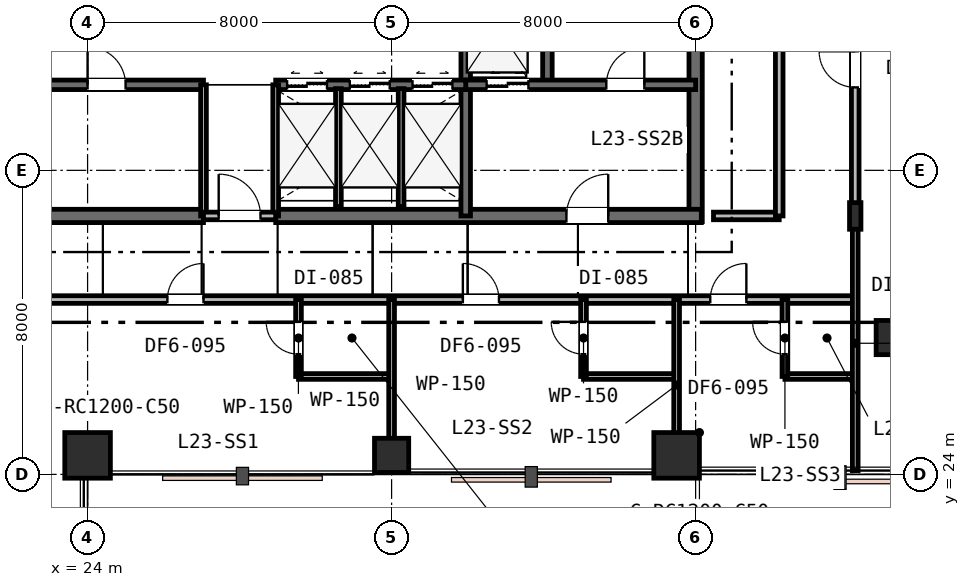
"""IFC4 building model, lengths in metres.
Left out: names, types, materials, properties, quantities, classifications, styles, units other than length and angle.
Written with IfcOpenShell. Run it as: python <this file> out.ifc"""

import sys

from ifc_helpers import new_model, si_unit, direction, frame, frame_2d, origin, origin_2d, place, context, subcontext, project, spatial, rectangle, i_section, extrude, element, fill, save


model = new_model("IFC4")
c1 = context("Model", 3, precision=1e-05, world=origin(), true_north=direction((0.0, 1.0)))
c2 = subcontext(c1, "Body", "Model", "MODEL_VIEW")
j1 = project(units=[si_unit("LENGTHUNIT", "METRE"), si_unit("PLANEANGLEUNIT", "RADIAN")], contexts=[c1])
p1 = place(None, origin())
s1 = spatial("IfcSite", under=j1, at=p1, CompositionType="ELEMENT")
p2 = place(p1, origin())
s2 = spatial("IfcBuilding", under=s1, at=p2, CompositionType="ELEMENT")
p3 = place(p2, frame((0.0, 0.0, 93.6)))
s3 = spatial("IfcBuildingStorey", under=s2, at=p3, CompositionType="ELEMENT", Elevation=93.6)
p4 = place(p3, frame((40.0, 30.65, 0.0), z_axis=(0.0, 0.0, 1.0), x_axis=(0.0, 1.0, 0.0)))
e1 = element("IfcWall", 1, at=p4, inside=s3, PredefinedType="SHEAR", context=c2, shape_type="SweptSolid", body=[
    extrude(rectangle(XDim=12.3, YDim=0.35, at=frame_2d((6.15, 0.0))), origin(), (0.0, 0.0, 1.0), 3.6),
])
p5 = place(p3, frame((15.85, 30.8, 0.0), z_axis=(0.0, 0.0, 1.0), x_axis=(1.0, 0.0, 0.0)))
e2 = element("IfcWall", 2, at=p5, inside=s3, PredefinedType="SHEAR", context=c2, shape_type="SweptSolid", body=[
    extrude(rectangle(XDim=11.2, YDim=0.35, at=frame_2d((5.6, 0.0))), origin(), (0.0, 0.0, 1.0), 3.6),
])
p6 = place(p5, frame((2.45, 0.0, 0.0)))
e3 = element("IfcOpeningElement", 3, at=p6, cuts=e2, PredefinedType="OPENING", context=c2, shape_type="SweptSolid", body=[
    extrude(rectangle(XDim=1.1, YDim=2.15, at=frame_2d((0.55, 1.075))), frame((0.0, 0.185, 0.0), z_axis=(0.0, -1.0, 0.0), x_axis=(1.0, 0.0, 0.0)), (0.0, 0.0, 1.0), 0.37),
])
p7 = place(p3, frame((28.95, 30.8, 0.0), z_axis=(0.0, 0.0, 1.0), x_axis=(1.0, 0.0, 0.0)))
e4 = element("IfcWall", 4, at=p7, inside=s3, PredefinedType="SHEAR", context=c2, shape_type="SweptSolid", body=[
    extrude(rectangle(XDim=11.2, YDim=0.35, at=frame_2d((5.6, 0.0))), origin(), (0.0, 0.0, 1.0), 3.6),
])
p8 = place(p7, frame((7.65, 0.0, 0.0)))
e5 = element("IfcOpeningElement", 5, at=p8, cuts=e4, PredefinedType="OPENING", context=c2, shape_type="SweptSolid", body=[
    extrude(rectangle(XDim=1.1, YDim=2.15, at=frame_2d((0.55, 1.075))), frame((0.0, 0.185, 0.0), z_axis=(0.0, -1.0, 0.0), x_axis=(1.0, 0.0, 0.0)), (0.0, 0.0, 1.0), 0.37),
])
p9 = place(p3, frame((36.1, 34.25, 0.0), z_axis=(0.0, 0.0, 1.0), x_axis=(0.0, 1.0, 0.0)))
e6 = element("IfcWall", 6, at=p9, inside=s3, PredefinedType="SHEAR", context=c2, shape_type="SweptSolid", body=[
    extrude(rectangle(XDim=8.65, YDim=0.25, at=frame_2d((4.325, 0.0))), origin(), (0.0, 0.0, 1.0), 3.6),
])
p10 = place(p3, frame((33.95, 30.8, 0.0), z_axis=(0.0, 0.0, 1.0), x_axis=(0.0, 1.0, 0.0)))
e7 = element("IfcWall", 7, at=p10, inside=s3, PredefinedType="SHEAR", context=c2, shape_type="SweptSolid", body=[
    extrude(rectangle(XDim=6.45, YDim=0.25, at=frame_2d((3.225, 0.0))), origin(), (0.0, 0.0, 1.0), 3.6),
])
p11 = place(p3, frame((33.95, 34.25, 0.0), z_axis=(0.0, 0.0, 1.0), x_axis=(1.0, 0.0, 0.0)))
e8 = element("IfcWall", 8, at=p11, inside=s3, PredefinedType="SHEAR", context=c2, shape_type="SweptSolid", body=[
    extrude(rectangle(XDim=6.05, YDim=0.25, at=frame_2d((3.025, 0.0))), origin(), (0.0, 0.0, 1.0), 3.6),
])
p12 = place(p11, frame((3.7, 0.0, 0.0)))
e9 = element("IfcOpeningElement", 9, at=p12, cuts=e8, PredefinedType="OPENING", context=c2, shape_type="SweptSolid", body=[
    extrude(rectangle(XDim=1.0, YDim=2.15, at=frame_2d((0.5, 1.075))), frame((0.0, 0.135, 0.0), z_axis=(0.0, -1.0, 0.0), x_axis=(1.0, 0.0, 0.0)), (0.0, 0.0, 1.0), 0.27),
])
p13 = place(p11, frame((0.55, 0.0, 0.0)))
e10 = element("IfcOpeningElement", 10, at=p13, cuts=e8, PredefinedType="OPENING", context=c2, shape_type="SweptSolid", body=[
    extrude(rectangle(XDim=1.1, YDim=2.15, at=frame_2d((0.55, 1.075))), frame((0.0, 0.135, 0.0), z_axis=(0.0, -1.0, 0.0), x_axis=(1.0, 0.0, 0.0)), (0.0, 0.0, 1.0), 0.27),
])
p14 = place(p3, frame((22.05, 34.25, 0.0), z_axis=(0.0, 0.0, 1.0), x_axis=(1.0, 0.0, 0.0)))
e11 = element("IfcWall", 11, at=p14, inside=s3, PredefinedType="SHEAR", context=c2, shape_type="SweptSolid", body=[
    extrude(rectangle(XDim=5.0, YDim=0.25, at=frame_2d((2.5, 0.0))), origin(), (0.0, 0.0, 1.0), 3.6),
])
p15 = place(p14, frame((1.95, 0.0, 0.0)))
e12 = element("IfcOpeningElement", 12, at=p15, cuts=e11, PredefinedType="OPENING", context=c2, shape_type="SweptSolid", body=[
    extrude(rectangle(XDim=1.0, YDim=2.15, at=frame_2d((0.5, 1.075))), frame((0.0, 0.135, 0.0), z_axis=(0.0, -1.0, 0.0), x_axis=(1.0, 0.0, 0.0)), (0.0, 0.0, 1.0), 0.27),
])
p16 = place(p3, frame((28.95, 34.25, 0.0), z_axis=(0.0, 0.0, 1.0), x_axis=(1.0, 0.0, 0.0)))
e13 = element("IfcWall", 13, at=p16, inside=s3, PredefinedType="SHEAR", context=c2, shape_type="SweptSolid", body=[
    extrude(rectangle(XDim=5.0, YDim=0.25, at=frame_2d((2.5, 0.0))), origin(), (0.0, 0.0, 1.0), 3.6),
])
p17 = place(p16, frame((0.3, 0.0, 0.0)))
e14 = element("IfcOpeningElement", 14, at=p17, cuts=e13, PredefinedType="OPENING", context=c2, shape_type="SweptSolid", body=[
    extrude(rectangle(XDim=1.05, YDim=2.15, at=frame_2d((0.525, 1.075))), frame((0.0, 0.135, 0.0), z_axis=(0.0, -1.0, 0.0), x_axis=(1.0, 0.0, 0.0)), (0.0, 0.0, 1.0), 0.27),
])
p18 = place(p16, frame((1.95, 0.0, 0.0)))
e15 = element("IfcOpeningElement", 15, at=p18, cuts=e13, PredefinedType="OPENING", context=c2, shape_type="SweptSolid", body=[
    extrude(rectangle(XDim=1.05, YDim=2.15, at=frame_2d((0.525, 1.075))), frame((0.0, 0.135, 0.0), z_axis=(0.0, -1.0, 0.0), x_axis=(1.0, 0.0, 0.0)), (0.0, 0.0, 1.0), 0.27),
])
p19 = place(p16, frame((3.6, 0.0, 0.0)))
e16 = element("IfcOpeningElement", 16, at=p19, cuts=e13, PredefinedType="OPENING", context=c2, shape_type="SweptSolid", body=[
    extrude(rectangle(XDim=1.05, YDim=2.15, at=frame_2d((0.525, 1.075))), frame((0.0, 0.135, 0.0), z_axis=(0.0, -1.0, 0.0), x_axis=(1.0, 0.0, 0.0)), (0.0, 0.0, 1.0), 0.27),
])
p20 = place(p3, frame((24.0, 24.5, 0.0), z_axis=(0.0, 0.0, 1.0), x_axis=(1.0, 0.0, 0.0)))
e17 = element("IfcColumn", 17, at=p20, inside=s3, PredefinedType="COLUMN", context=c2, shape_type="SweptSolid", body=[
    extrude(rectangle(XDim=1.2, YDim=1.2, at=origin_2d()), origin(), (0.0, 0.0, 1.0), 3.6),
])
p21 = place(p3, frame((32.0, 24.5, 0.0), z_axis=(0.0, 0.0, 1.0), x_axis=(1.0, 0.0, 0.0)))
e18 = element("IfcColumn", 18, at=p21, inside=s3, PredefinedType="COLUMN", context=c2, shape_type="SweptSolid", body=[
    extrude(rectangle(XDim=0.9, YDim=0.9, at=origin_2d()), origin(), (0.0, 0.0, 1.0), 3.6),
])
p22 = place(p3, frame((39.5, 24.5, 0.0), z_axis=(0.0, 0.0, 1.0), x_axis=(1.0, 0.0, 0.0)))
e19 = element("IfcColumn", 19, at=p22, inside=s3, PredefinedType="COLUMN", context=c2, shape_type="SweptSolid", body=[
    extrude(rectangle(XDim=1.2, YDim=1.2, at=origin_2d()), origin(), (0.0, 0.0, 1.0), 3.6),
])
p23 = place(p3, frame((45.2, 27.6, 0.0), z_axis=(0.0, 0.0, 1.0), x_axis=(1.0, 0.0, 0.0)))
e20 = element("IfcColumn", 20, at=p23, inside=s3, PredefinedType="COLUMN", context=c2, shape_type="SweptSolid", body=[
    extrude(rectangle(XDim=0.9, YDim=0.9, at=origin_2d()), origin(), (0.0, 0.0, 1.0), 3.6),
])
p24 = place(p3, frame((44.2, 30.8, 0.0), z_axis=(0.0, 0.0, 1.0), x_axis=(1.0, 0.0, 0.0)))
e21 = element("IfcColumn", 21, at=p24, inside=s3, PredefinedType="COLUMN", context=c2, shape_type="SweptSolid", body=[
    extrude(i_section(OverallWidth=0.3, OverallDepth=0.7, WebThickness=0.017, FlangeThickness=0.032, FilletRadius=0.027, at=origin_2d()), origin(), (0.0, 0.0, 1.0), 3.6),
])
p25 = place(p3, frame((27.05, 30.8, 0.0), z_axis=(0.0, 0.0, 1.0), x_axis=(0.0, 1.0, 0.0)))
e22 = element("IfcWall", 22, at=p25, inside=s3, PredefinedType="PLUMBINGWALL", context=c2, shape_type="SweptSolid", body=[
    extrude(rectangle(XDim=3.45, YDim=0.15, at=frame_2d((1.725, 0.0))), origin(), (0.0, 0.0, 1.0), 3.02),
])
p26 = place(p3, frame((28.95, 30.8, 0.0), z_axis=(0.0, 0.0, 1.0), x_axis=(0.0, 1.0, 0.0)))
e23 = element("IfcWall", 23, at=p26, inside=s3, PredefinedType="PLUMBINGWALL", context=c2, shape_type="SweptSolid", body=[
    extrude(rectangle(XDim=3.45, YDim=0.15, at=frame_2d((1.725, 0.0))), origin(), (0.0, 0.0, 1.0), 3.33),
])
p27 = place(p3, frame((27.05, 30.8, 0.0), z_axis=(0.0, 0.0, 1.0), x_axis=(1.0, 0.0, 0.0)))
e24 = element("IfcWall", 24, at=p27, inside=s3, PredefinedType="PARTITIONING", context=c2, shape_type="SweptSolid", body=[
    extrude(rectangle(XDim=1.9, YDim=0.2, at=frame_2d((0.95, 0.0))), origin(), (0.0, 0.0, 1.0), 3.02),
])
p28 = place(p27, frame((0.4, 0.0, 0.0)))
e25 = element("IfcOpeningElement", 25, at=p28, cuts=e24, PredefinedType="OPENING", context=c2, shape_type="SweptSolid", body=[
    extrude(rectangle(XDim=1.1, YDim=2.15, at=frame_2d((0.55, 1.075))), frame((0.0, 0.11, 0.0), z_axis=(0.0, -1.0, 0.0), x_axis=(1.0, 0.0, 0.0)), (0.0, 0.0, 1.0), 0.22),
])
for number, where, z_axis, x_axis in (
    (26, (30.6, 31.05, 0.0), (0.0, 0.0, 1.0), (0.0, 1.0, 0.0)),
    (27, (32.25, 31.05, 0.0), (0.0, 0.0, 1.0), (0.0, 1.0, 0.0)),
):
    element("IfcWall", number, at=place(p3, frame(where, z_axis=z_axis, x_axis=x_axis)), inside=s3, PredefinedType="PLUMBINGWALL", context=c2, shape_type="SweptSolid", body=[
        extrude(rectangle(XDim=3.1, YDim=0.15, at=frame_2d((1.55, 0.0))), origin(), (0.0, 0.0, 1.0), 3.33),
    ])
p29 = place(p3, frame((11.4, 28.6, 0.0), z_axis=(0.0, 0.0, 1.0), x_axis=(1.0, 0.0, 0.0)))
e28 = element("IfcWall", 28, at=p29, inside=s3, PredefinedType="PARTITIONING", context=c2, shape_type="SweptSolid", body=[
    extrude(rectangle(XDim=32.8, YDim=0.2, at=frame_2d((16.4, 0.0))), origin(), (0.0, 0.0, 1.0), 2.83),
])
p30 = place(p29, frame((14.7, 0.0, 0.0)))
e29 = element("IfcOpeningElement", 29, at=p30, cuts=e28, PredefinedType="OPENING", context=c2, shape_type="SweptSolid", body=[
    extrude(rectangle(XDim=0.95, YDim=2.15, at=frame_2d((0.475, 1.075))), frame((0.0, 0.11, 0.0), z_axis=(0.0, -1.0, 0.0), x_axis=(1.0, 0.0, 0.0)), (0.0, 0.0, 1.0), 0.22),
])
p31 = place(p29, frame((22.475, 0.0, 0.0)))
e30 = element("IfcOpeningElement", 30, at=p31, cuts=e28, PredefinedType="OPENING", context=c2, shape_type="SweptSolid", body=[
    extrude(rectangle(XDim=0.95, YDim=2.15, at=frame_2d((0.475, 1.075))), frame((0.0, 0.11, 0.0), z_axis=(0.0, -1.0, 0.0), x_axis=(1.0, 0.0, 0.0)), (0.0, 0.0, 1.0), 0.22),
])
p32 = place(p29, frame((28.985, 0.0, 0.0)))
e31 = element("IfcOpeningElement", 31, at=p32, cuts=e28, PredefinedType="OPENING", context=c2, shape_type="SweptSolid", body=[
    extrude(rectangle(XDim=0.95, YDim=2.15, at=frame_2d((0.475, 1.075))), frame((0.0, 0.11, 0.0), z_axis=(0.0, -1.0, 0.0), x_axis=(1.0, 0.0, 0.0)), (0.0, 0.0, 1.0), 0.22),
])
p33 = place(p3, frame((40.47, 30.8, 0.0), z_axis=(0.0, 0.0, 1.0), x_axis=(1.0, 0.0, 0.0)))
e32 = element("IfcWall", 32, at=p33, inside=s3, PredefinedType="PARTITIONING", context=c2, shape_type="SweptSolid", body=[
    extrude(rectangle(XDim=1.73, YDim=0.2, at=frame_2d((0.865, 0.0))), origin(), (0.0, 0.0, 1.0), 2.83),
])
p34 = place(p3, frame((42.2, 30.8, 0.0), z_axis=(0.0, 0.0, 1.0), x_axis=(0.0, 1.0, 0.0)))
e33 = element("IfcWall", 33, at=p34, inside=s3, PredefinedType="PARTITIONING", context=c2, shape_type="SweptSolid", body=[
    extrude(rectangle(XDim=11.2, YDim=0.2, at=frame_2d((5.6, 0.0))), origin(), (0.0, 0.0, 1.0), 2.83),
])
p35 = place(p3, frame((29.55, 26.576, 0.0), z_axis=(0.0, 0.0, 1.0), x_axis=(1.0, 0.0, 0.0)))
e34 = element("IfcWall", 34, at=p35, inside=s3, PredefinedType="PARTITIONING", context=c2, shape_type="SweptSolid", body=[
    extrude(rectangle(XDim=2.45, YDim=0.15, at=frame_2d((1.225, 0.0))), origin(), (0.0, 0.0, 1.0), 3.33),
])
p36 = place(p3, frame((29.55, 26.576, 0.0), z_axis=(0.0, 0.0, 1.0), x_axis=(0.0, 1.0, 0.0)))
e35 = element("IfcWall", 35, at=p36, inside=s3, PredefinedType="PARTITIONING", context=c2, shape_type="SweptSolid", body=[
    extrude(rectangle(XDim=2.024, YDim=0.15, at=frame_2d((1.012, 0.0))), origin(), (0.0, 0.0, 1.0), 3.33),
])
p37 = place(p36, frame((0.587, 0.0, 0.0)))
e36 = element("IfcOpeningElement", 36, at=p37, cuts=e35, PredefinedType="OPENING", context=c2, shape_type="SweptSolid", body=[
    extrude(rectangle(XDim=0.85, YDim=2.15, at=frame_2d((0.425, 1.075))), frame((0.0, 0.085, 0.0), z_axis=(0.0, -1.0, 0.0), x_axis=(1.0, 0.0, 0.0)), (0.0, 0.0, 1.0), 0.17),
])
p38 = place(p3, frame((32.0, 28.6, 0.0), z_axis=(0.0, 0.0, 1.0), x_axis=(0.0, -1.0, 0.0)))
e37 = element("IfcWall", 37, at=p38, inside=s3, PredefinedType="PARTITIONING", context=c2, shape_type="SweptSolid", body=[
    extrude(rectangle(XDim=4.5, YDim=0.15, at=frame_2d((2.25, 0.0))), origin(), (0.0, 0.0, 1.0), 2.92),
])
p39 = place(p3, frame((37.05, 26.576, 0.0), z_axis=(0.0, 0.0, 1.0), x_axis=(1.0, 0.0, 0.0)))
e38 = element("IfcWall", 38, at=p39, inside=s3, PredefinedType="PARTITIONING", context=c2, shape_type="SweptSolid", body=[
    extrude(rectangle(XDim=2.45, YDim=0.15, at=frame_2d((1.225, 0.0))), origin(), (0.0, 0.0, 1.0), 2.83),
])
p40 = place(p3, frame((37.05, 26.576, 0.0), z_axis=(0.0, 0.0, 1.0), x_axis=(0.0, 1.0, 0.0)))
e39 = element("IfcWall", 39, at=p40, inside=s3, PredefinedType="PARTITIONING", context=c2, shape_type="SweptSolid", body=[
    extrude(rectangle(XDim=2.024, YDim=0.15, at=frame_2d((1.012, 0.0))), origin(), (0.0, 0.0, 1.0), 3.02),
])
p41 = place(p40, frame((0.587, 0.0, 0.0)))
e40 = element("IfcOpeningElement", 40, at=p41, cuts=e39, PredefinedType="OPENING", context=c2, shape_type="SweptSolid", body=[
    extrude(rectangle(XDim=0.85, YDim=2.15, at=frame_2d((0.425, 1.075))), frame((0.0, 0.085, 0.0), z_axis=(0.0, -1.0, 0.0), x_axis=(1.0, 0.0, 0.0)), (0.0, 0.0, 1.0), 0.17),
])
p42 = place(p3, frame((39.5, 28.6, 0.0), z_axis=(0.0, 0.0, 1.0), x_axis=(0.0, -1.0, 0.0)))
e41 = element("IfcWall", 41, at=p42, inside=s3, PredefinedType="PARTITIONING", context=c2, shape_type="SweptSolid", body=[
    extrude(rectangle(XDim=4.5, YDim=0.15, at=frame_2d((2.25, 0.0))), origin(), (0.0, 0.0, 1.0), 2.83),
])
p43 = place(p3, frame((42.35, 26.576, 0.0), z_axis=(0.0, 0.0, 1.0), x_axis=(1.0, 0.0, 0.0)))
e42 = element("IfcWall", 42, at=p43, inside=s3, PredefinedType="PARTITIONING", context=c2, shape_type="SweptSolid", body=[
    extrude(rectangle(XDim=1.85, YDim=0.15, at=frame_2d((0.925, 0.0))), origin(), (0.0, 0.0, 1.0), 3.33),
])
p44 = place(p3, frame((42.35, 26.576, 0.0), z_axis=(0.0, 0.0, 1.0), x_axis=(0.0, 1.0, 0.0)))
e43 = element("IfcWall", 43, at=p44, inside=s3, PredefinedType="PARTITIONING", context=c2, shape_type="SweptSolid", body=[
    extrude(rectangle(XDim=2.024, YDim=0.15, at=frame_2d((1.012, 0.0))), origin(), (0.0, 0.0, 1.0), 3.33),
])
p45 = place(p44, frame((0.587, 0.0, 0.0)))
e44 = element("IfcOpeningElement", 44, at=p45, cuts=e43, PredefinedType="OPENING", context=c2, shape_type="SweptSolid", body=[
    extrude(rectangle(XDim=0.85, YDim=2.15, at=frame_2d((0.425, 1.075))), frame((0.0, 0.085, 0.0), z_axis=(0.0, -1.0, 0.0), x_axis=(1.0, 0.0, 0.0)), (0.0, 0.0, 1.0), 0.17),
])
p46 = place(p3, frame((44.2, 30.8, 0.0), z_axis=(0.0, 0.0, 1.0), x_axis=(0.0, -1.0, 0.0)))
e45 = element("IfcWall", 45, at=p46, inside=s3, PredefinedType="PARTITIONING", context=c2, shape_type="SweptSolid", body=[
    extrude(rectangle(XDim=6.7, YDim=0.15, at=frame_2d((3.35, 0.0))), origin(), (0.0, 0.0, 1.0), 2.83),
])
p47 = place(p3, frame((44.2, 30.8, 0.0), z_axis=(0.0, 0.0, 1.0), x_axis=(0.0, 1.0, 0.0)))
e46 = element("IfcWall", 46, at=p47, inside=s3, PredefinedType="PARTITIONING", context=c2, shape_type="SweptSolid", body=[
    extrude(rectangle(XDim=17.1, YDim=0.2, at=frame_2d((8.55, 0.0))), origin(), (0.0, 0.0, 1.0), 2.83),
])
p48 = place(p47, frame((3.382, 0.0, 0.0)))
e47 = element("IfcOpeningElement", 47, at=p48, cuts=e46, PredefinedType="OPENING", context=c2, shape_type="SweptSolid", body=[
    extrude(rectangle(XDim=0.95, YDim=2.15, at=frame_2d((0.475, 1.075))), frame((0.0, 0.11, 0.0), z_axis=(0.0, -1.0, 0.0), x_axis=(1.0, 0.0, 0.0)), (0.0, 0.0, 1.0), 0.22),
])
p49 = place(p28, origin())
e48 = element("IfcDoor", 48, at=p49, inside=s3, OperationType="SINGLE_SWING_LEFT", PredefinedType="DOOR", context=c2, shape_type="SweptSolid", body=[
    extrude(rectangle(XDim=1.1, YDim=2.15, at=frame_2d((0.55, 1.075))), frame((0.0, 0.025, 0.0), z_axis=(0.0, -1.0, 0.0), x_axis=(1.0, 0.0, 0.0)), (0.0, 0.0, 1.0), 0.05),
])
fill(e25, e48)
p50 = place(p12, origin())
e49 = element("IfcDoor", 49, at=p50, inside=s3, OperationType="SINGLE_SWING_RIGHT", PredefinedType="DOOR", context=c2, shape_type="SweptSolid", body=[
    extrude(rectangle(XDim=1.0, YDim=2.15, at=frame_2d((0.5, 1.075))), frame((0.0, 0.025, 0.0), z_axis=(0.0, -1.0, 0.0), x_axis=(1.0, 0.0, 0.0)), (0.0, 0.0, 1.0), 0.05),
])
fill(e9, e49)
p51 = place(p8, origin())
e50 = element("IfcDoor", 50, at=p51, inside=s3, OperationType="SINGLE_SWING_RIGHT", PredefinedType="DOOR", context=c2, shape_type="SweptSolid", body=[
    extrude(rectangle(XDim=1.1, YDim=2.15, at=frame_2d((0.55, 1.075))), frame((0.0, 0.025, 0.0), z_axis=(0.0, -1.0, 0.0), x_axis=(1.0, 0.0, 0.0)), (0.0, 0.0, 1.0), 0.05),
])
fill(e5, e50)
p52 = place(p15, origin())
e51 = element("IfcDoor", 51, at=p52, inside=s3, OperationType="SINGLE_SWING_LEFT", PredefinedType="DOOR", context=c2, shape_type="SweptSolid", body=[
    extrude(rectangle(XDim=1.0, YDim=2.15, at=frame_2d((0.5, 1.075))), frame((0.0, 0.025, 0.0), z_axis=(0.0, -1.0, 0.0), x_axis=(1.0, 0.0, 0.0)), (0.0, 0.0, 1.0), 0.05),
])
fill(e12, e51)
p53 = place(p30, origin())
e52 = element("IfcDoor", 52, at=p53, inside=s3, OperationType="SINGLE_SWING_RIGHT", PredefinedType="DOOR", context=c2, shape_type="SweptSolid", body=[
    extrude(rectangle(XDim=0.95, YDim=2.15, at=frame_2d((0.475, 1.075))), frame((0.0, 0.025, 0.0), z_axis=(0.0, -1.0, 0.0), x_axis=(1.0, 0.0, 0.0)), (0.0, 0.0, 1.0), 0.05),
])
fill(e29, e52)
p54 = place(p37, origin())
e53 = element("IfcDoor", 53, at=p54, inside=s3, OperationType="SINGLE_SWING_RIGHT", PredefinedType="DOOR", context=c2, shape_type="SweptSolid", body=[
    extrude(rectangle(XDim=0.85, YDim=2.15, at=frame_2d((0.425, 1.075))), frame((0.0, 0.025, 0.0), z_axis=(0.0, -1.0, 0.0), x_axis=(1.0, 0.0, 0.0)), (0.0, 0.0, 1.0), 0.05),
])
fill(e36, e53)
p55 = place(p31, origin())
e54 = element("IfcDoor", 54, at=p55, inside=s3, OperationType="SINGLE_SWING_LEFT", PredefinedType="DOOR", context=c2, shape_type="SweptSolid", body=[
    extrude(rectangle(XDim=0.95, YDim=2.15, at=frame_2d((0.475, 1.075))), frame((0.0, 0.025, 0.0), z_axis=(0.0, -1.0, 0.0), x_axis=(1.0, 0.0, 0.0)), (0.0, 0.0, 1.0), 0.05),
])
fill(e30, e54)
p56 = place(p41, origin())
e55 = element("IfcDoor", 55, at=p56, inside=s3, OperationType="SINGLE_SWING_RIGHT", PredefinedType="DOOR", context=c2, shape_type="SweptSolid", body=[
    extrude(rectangle(XDim=0.85, YDim=2.15, at=frame_2d((0.425, 1.075))), frame((0.0, 0.025, 0.0), z_axis=(0.0, -1.0, 0.0), x_axis=(1.0, 0.0, 0.0)), (0.0, 0.0, 1.0), 0.05),
])
fill(e40, e55)
p57 = place(p32, origin())
e56 = element("IfcDoor", 56, at=p57, inside=s3, OperationType="SINGLE_SWING_RIGHT", PredefinedType="DOOR", context=c2, shape_type="SweptSolid", body=[
    extrude(rectangle(XDim=0.95, YDim=2.15, at=frame_2d((0.475, 1.075))), frame((0.0, 0.025, 0.0), z_axis=(0.0, -1.0, 0.0), x_axis=(1.0, 0.0, 0.0)), (0.0, 0.0, 1.0), 0.05),
])
fill(e31, e56)
p58 = place(p45, origin())
e57 = element("IfcDoor", 57, at=p58, inside=s3, OperationType="SINGLE_SWING_RIGHT", PredefinedType="DOOR", context=c2, shape_type="SweptSolid", body=[
    extrude(rectangle(XDim=0.85, YDim=2.15, at=frame_2d((0.425, 1.075))), frame((0.0, 0.025, 0.0), z_axis=(0.0, -1.0, 0.0), x_axis=(1.0, 0.0, 0.0)), (0.0, 0.0, 1.0), 0.05),
])
fill(e44, e57)
p59 = place(p48, origin())
e58 = element("IfcDoor", 58, at=p59, inside=s3, OperationType="SINGLE_SWING_RIGHT", PredefinedType="DOOR", context=c2, shape_type="SweptSolid", body=[
    extrude(rectangle(XDim=0.95, YDim=2.15, at=frame_2d((0.475, 1.075))), frame((0.0, 0.025, 0.0), z_axis=(0.0, -1.0, 0.0), x_axis=(1.0, 0.0, 0.0)), (0.0, 0.0, 1.0), 0.05),
])
fill(e47, e58)
p60 = place(p13, origin())
e59 = element("IfcDoor", 59, at=p60, inside=s3, OperationType="DOUBLE_DOOR_SLIDING", PredefinedType="DOOR", context=c2, shape_type="SweptSolid", body=[
    extrude(rectangle(XDim=1.1, YDim=2.15, at=frame_2d((0.55, 1.075))), frame((0.0, 0.025, 0.0), z_axis=(0.0, -1.0, 0.0), x_axis=(1.0, 0.0, 0.0)), (0.0, 0.0, 1.0), 0.05),
])
fill(e10, e59)
p61 = place(p17, origin())
e60 = element("IfcDoor", 60, at=p61, inside=s3, OperationType="DOUBLE_DOOR_SLIDING", PredefinedType="DOOR", context=c2, shape_type="SweptSolid", body=[
    extrude(rectangle(XDim=1.05, YDim=2.15, at=frame_2d((0.525, 1.075))), frame((0.0, 0.025, 0.0), z_axis=(0.0, -1.0, 0.0), x_axis=(1.0, 0.0, 0.0)), (0.0, 0.0, 1.0), 0.05),
])
fill(e14, e60)
p62 = place(p18, origin())
e61 = element("IfcDoor", 61, at=p62, inside=s3, OperationType="DOUBLE_DOOR_SLIDING", PredefinedType="DOOR", context=c2, shape_type="SweptSolid", body=[
    extrude(rectangle(XDim=1.05, YDim=2.15, at=frame_2d((0.525, 1.075))), frame((0.0, 0.025, 0.0), z_axis=(0.0, -1.0, 0.0), x_axis=(1.0, 0.0, 0.0)), (0.0, 0.0, 1.0), 0.05),
])
fill(e15, e61)
p63 = place(p19, origin())
e62 = element("IfcDoor", 62, at=p63, inside=s3, OperationType="DOUBLE_DOOR_SLIDING", PredefinedType="DOOR", context=c2, shape_type="SweptSolid", body=[
    extrude(rectangle(XDim=1.05, YDim=2.15, at=frame_2d((0.525, 1.075))), frame((0.0, 0.025, 0.0), z_axis=(0.0, -1.0, 0.0), x_axis=(1.0, 0.0, 0.0)), (0.0, 0.0, 1.0), 0.05),
])
fill(e16, e62)
save(model, sys.argv[1])
